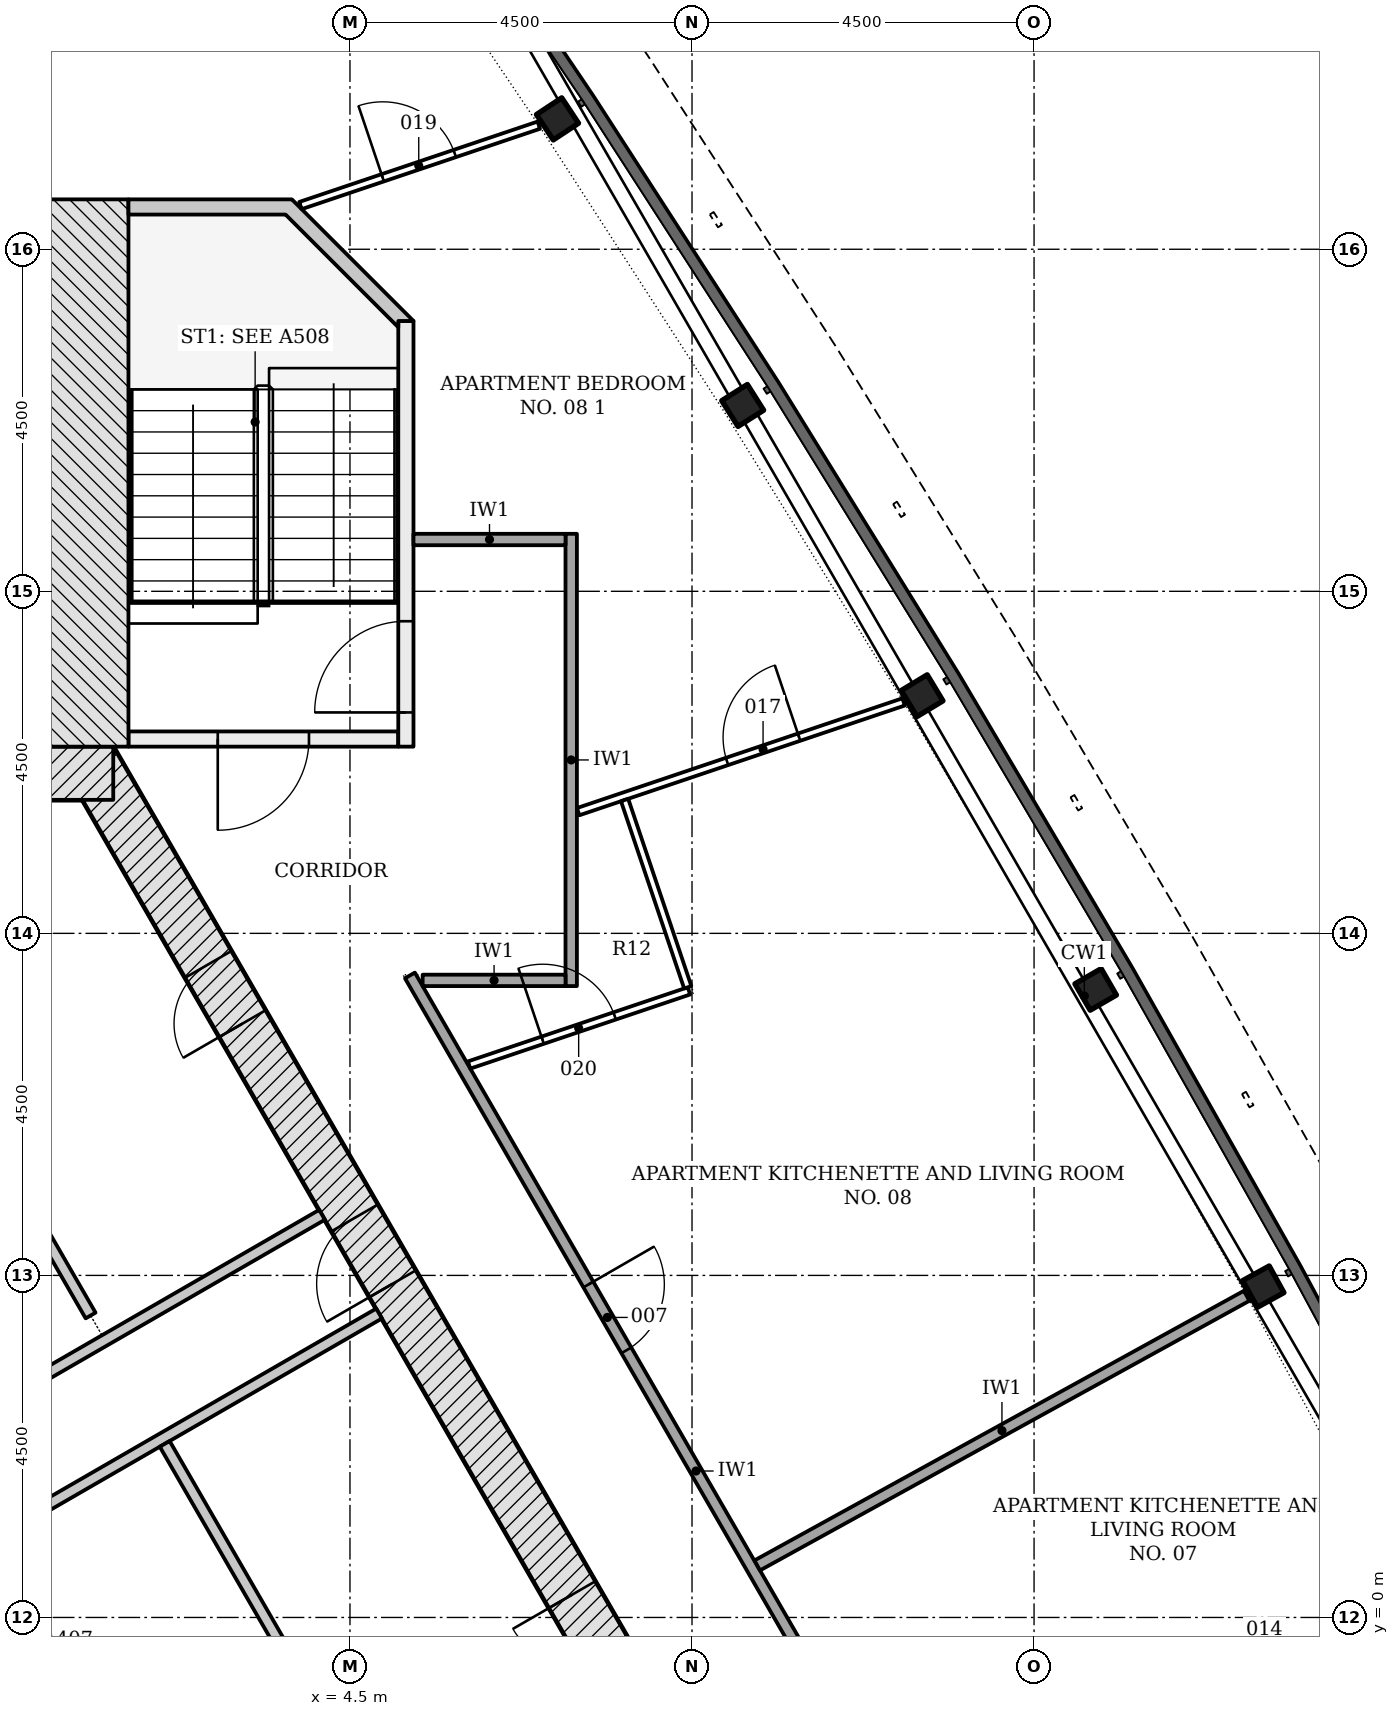
"""IFC4 building model, lengths in metres.
Left out: names, types, materials, properties, quantities, classifications, styles, units other than length and angle.
Written with IfcOpenShell. Run it as: python <this file> out.ifc"""

import sys

from ifc_helpers import new_model, si_unit, direction, frame, frame_2d, origin, origin_2d, place, context, subcontext, project, spatial, polyline, rectangle, i_section, outline, extrude, element, fill, save


model = new_model("IFC4")
c1 = context("Model", 3, precision=1e-05, world=origin(), true_north=direction((0.0, 1.0)))
c2 = subcontext(c1, "Body", "Model", "MODEL_VIEW")
j1 = project(units=[si_unit("LENGTHUNIT", "METRE"), si_unit("PLANEANGLEUNIT", "RADIAN")], contexts=[c1])
p1 = place(None, origin())
s1 = spatial("IfcSite", under=j1, at=p1, CompositionType="ELEMENT")
p2 = place(p1, origin())
s2 = spatial("IfcBuilding", under=s1, at=p2, CompositionType="ELEMENT")
p3 = place(p2, frame((0.0, 0.0, 109.5)))
s3 = spatial("IfcBuildingStorey", under=s2, at=p3, CompositionType="ELEMENT", Elevation=109.5)
p4 = place(p3, frame((10.311, -4.703, -0.2), z_axis=(0.0, 0.0, 1.0), x_axis=(-0.500001446645, 0.866024568562, 0.0)))
e1 = element("IfcWall", 1, at=p4, inside=s3, PredefinedType="SHEAR", context=c2, shape_type="SweptSolid", body=[
    extrude(rectangle(XDim=18.458, YDim=0.7, at=frame_2d((9.229, 0.0))), origin(), (0.0, 0.0, 1.0), 3.6),
])
p5 = place(p4, frame((10.5, 0.0, 0.2)))
e2 = element("IfcOpeningElement", 2, at=p5, cuts=e1, PredefinedType="OPENING", context=c2, shape_type="SweptSolid", body=[
    extrude(rectangle(XDim=1.0, YDim=2.1, at=frame_2d((0.5, 1.05))), frame((0.0, 0.36, 0.0), z_axis=(0.0, -1.0, 0.0), x_axis=(1.0, 0.0, 0.0)), (0.0, 0.0, 1.0), 0.72),
])
p6 = place(p4, frame((4.877, 0.0, 0.2)))
e3 = element("IfcOpeningElement", 3, at=p6, cuts=e1, PredefinedType="OPENING", context=c2, shape_type="SweptSolid", body=[
    extrude(rectangle(XDim=0.9, YDim=2.1, at=frame_2d((0.45, 1.05))), frame((0.0, 0.36, 0.0), z_axis=(0.0, -1.0, 0.0), x_axis=(1.0, 0.0, 0.0)), (0.0, 0.0, 1.0), 0.72),
])
p7 = place(p4, frame((14.452, 0.0, 0.2)))
e4 = element("IfcOpeningElement", 4, at=p7, cuts=e1, PredefinedType="OPENING", context=c2, shape_type="SweptSolid", body=[
    extrude(rectangle(XDim=0.9, YDim=2.1, at=frame_2d((0.45, 1.05))), frame((0.0, 0.36, 0.0), z_axis=(0.0, -1.0, 0.0), x_axis=(1.0, 0.0, 0.0)), (0.0, 0.0, 1.0), 0.72),
])
p8 = place(p3, frame((1.386, 11.106, -0.2), z_axis=(0.0, 0.0, 1.0), x_axis=(-1.0, 0.0, 0.0)))
e5 = element("IfcWall", 5, at=p8, inside=s3, PredefinedType="SHEAR", context=c2, shape_type="SweptSolid", body=[
    extrude(rectangle(XDim=2.771, YDim=0.7, at=frame_2d((1.386, 0.0))), origin(), (0.0, 0.0, 1.0), 3.6),
])
for number, where, z_axis, x_axis in (
    (6, (16.516, 4.353, -0.2), (0.0, 0.0, 1.0), (-0.483, 0.876, 0.0)),
    (7, (14.311, 8.262, -0.2), (0.0, 0.0, 1.0), (-0.5, 0.866, 0.0)),
    (8, (12.027, 12.127, -0.2), (0.0, 0.0, 1.0), (-0.517, 0.856, 0.0)),
    (9, (9.667, 15.945, -0.2), (0.0, 0.0, 1.0), (-0.534, 0.845, 0.0)),
    (10, (7.23, 19.715, -0.2), (0.0, 0.0, 1.0), (-0.551, 0.834, 0.0)),
):
    element("IfcColumn", number, at=place(p3, frame(where, z_axis=z_axis, x_axis=x_axis)), inside=s3, PredefinedType="COLUMN", context=c2, shape_type="SweptSolid", body=[
        extrude(i_section(OverallWidth=0.401, OverallDepth=0.399, WebThickness=0.025, FlangeThickness=0.04, FilletRadius=0.015, at=origin_2d()), origin(), (0.0, 0.0, 1.0), 3.6),
    ])
p9 = place(p3, frame((-4.198, -1.244, 0.0), z_axis=(0.0, 0.0, 1.0), x_axis=(0.866020798945, 0.500007975732, 0.0)))
e11 = element("IfcWall", 11, at=p9, inside=s3, PredefinedType="PARTITIONING", context=c2, shape_type="SweptSolid", body=[
    extrude(rectangle(XDim=10.486, YDim=0.15, at=frame_2d((5.243, 0.0))), origin(), (0.0, 0.0, 1.0), 3.4),
])
p10 = place(p9, frame((3.736, 0.0, 0.0)))
e12 = element("IfcOpeningElement", 12, at=p10, cuts=e11, PredefinedType="OPENING", context=c2, shape_type="SweptSolid", body=[
    extrude(rectangle(XDim=0.9, YDim=2.1, at=frame_2d((0.45, 1.05))), frame((0.0, 0.085, 0.0), z_axis=(0.0, -1.0, 0.0), x_axis=(1.0, 0.0, 0.0)), (0.0, 0.0, 1.0), 0.17),
])
p11 = place(p9, frame((0.144, 0.0, 0.0)))
e13 = element("IfcOpeningElement", 13, at=p11, cuts=e11, PredefinedType="OPENING", context=c2, shape_type="SweptSolid", body=[
    extrude(rectangle(XDim=0.9, YDim=2.1, at=frame_2d((0.45, 1.05))), frame((0.0, 0.085, 0.0), z_axis=(0.0, -1.0, 0.0), x_axis=(1.0, 0.0, 0.0)), (0.0, 0.0, 1.0), 0.17),
])
p12 = place(p3, frame((5.367, -3.439, 0.0), z_axis=(0.0, 0.0, 1.0), x_axis=(-0.499981499682, 0.866036084685, 0.0)))
e14 = element("IfcWall", 14, at=p12, inside=s3, PredefinedType="PARTITIONING", context=c2, shape_type="SweptSolid", body=[
    extrude(rectangle(XDim=6.608, YDim=0.15, at=frame_2d((3.304, 0.0))), origin(), (0.0, 0.0, 1.0), 3.4),
])
p13 = place(p3, frame((-2.698, 1.354, 0.0), z_axis=(0.0, 0.0, 1.0), x_axis=(0.866021157486, 0.500007354732, 0.0)))
e15 = element("IfcWall", 15, at=p13, inside=s3, PredefinedType="PARTITIONING", context=c2, shape_type="SweptSolid", body=[
    extrude(rectangle(XDim=7.888, YDim=0.15, at=frame_2d((3.944, 0.0))), origin(), (0.0, 0.0, 1.0), 3.4),
])
p14 = place(p13, frame((1.845, 0.0, 0.0)))
e16 = element("IfcOpeningElement", 16, at=p14, cuts=e15, PredefinedType="OPENING", context=c2, shape_type="SweptSolid", body=[
    extrude(rectangle(XDim=0.9, YDim=2.1, at=frame_2d((0.45, 1.05))), frame((0.0, 0.085, 0.0), z_axis=(0.0, -1.0, 0.0), x_axis=(1.0, 0.0, 0.0)), (0.0, 0.0, 1.0), 0.17),
])
p15 = place(p3, frame((1.088, 3.972, 0.0), z_axis=(0.0, 0.0, 1.0), x_axis=(-0.500116913307, 0.865957893332, 0.0)))
e17 = element("IfcWall", 17, at=p15, inside=s3, PredefinedType="PARTITIONING", context=c2, shape_type="SweptSolid", body=[
    extrude(rectangle(XDim=2.304, YDim=0.15, at=frame_2d((1.152, 0.0))), origin(), (0.0, 0.0, 1.0), 3.4),
])
p16 = place(p3, frame((5.135, 11.556, -0.2), z_axis=(0.0, 0.0, 1.0), x_axis=(-1.0, 0.0, 0.0)))
e18 = element("IfcWall", 18, at=p16, inside=s3, PredefinedType="SHEAR", context=c2, shape_type="SweptSolid", body=[
    extrude(rectangle(XDim=3.55, YDim=0.2, at=frame_2d((1.775, 0.0))), origin(), (0.0, 0.0, 1.0), 3.6),
])
p17 = place(p16, frame((1.175, 0.0, 0.2)))
e19 = element("IfcOpeningElement", 19, at=p17, cuts=e18, PredefinedType="OPENING", context=c2, shape_type="SweptSolid", body=[
    extrude(rectangle(XDim=1.2, YDim=2.1, at=frame_2d((0.6, 1.05))), frame((0.0, 0.11, 0.0), z_axis=(0.0, -1.0, 0.0), x_axis=(1.0, 0.0, 0.0)), (0.0, 0.0, 1.0), 0.22),
])
p18 = place(p3, frame((5.236, 11.456, -0.2), z_axis=(0.0, 0.0, 1.0), x_axis=(0.0, 1.0, 0.0)))
e20 = element("IfcWall", 20, at=p18, inside=s3, PredefinedType="SHEAR", context=c2, shape_type="SweptSolid", body=[
    extrude(rectangle(XDim=5.6, YDim=0.2, at=frame_2d((2.8, 0.0))), origin(), (0.0, 0.0, 1.0), 3.6),
])
p19 = place(p18, frame((0.45, 0.0, 0.2)))
e21 = element("IfcOpeningElement", 21, at=p19, cuts=e20, PredefinedType="OPENING", context=c2, shape_type="SweptSolid", body=[
    extrude(rectangle(XDim=1.2, YDim=2.1, at=frame_2d((0.6, 1.05))), frame((0.0, 0.11, 0.0), z_axis=(0.0, -1.0, 0.0), x_axis=(1.0, 0.0, 0.0)), (0.0, 0.0, 1.0), 0.22),
])
p20 = place(p3, frame((0.993, 11.456, -0.2), z_axis=(0.0, 0.0, 1.0), x_axis=(0.0, 1.0, 0.0)))
e22 = element("IfcWall", 22, at=p20, inside=s3, PredefinedType="SHEAR", context=c2, shape_type="SweptSolid", body=[
    extrude(rectangle(XDim=7.2, YDim=1.186, at=frame_2d((3.6, 0.0))), origin(), (0.0, 0.0, 1.0), 3.6),
])
p21 = place(p3, frame((0.0, 0.0, -0.2)))
e23 = element("IfcWall", 23, at=p21, inside=s3, PredefinedType="SHEAR", context=c2, shape_type="SweptSolid", body=[
    extrude(outline(polyline([(5.336, 17.056), (3.736, 18.656), (1.586, 18.656), (1.586, 18.456), (3.653, 18.456), (5.135, 16.974), (5.135, 17.056), (5.135, 17.056), (5.135, 17.056), (5.135, 17.056), (5.135, 17.056), (5.135, 17.056), (5.135, 17.056), (5.135, 17.056), (5.135, 17.056), (5.135, 17.056), (5.135, 17.056), (5.135, 17.056), (5.135, 17.056), (5.135, 17.056), (5.135, 17.056), (5.135, 17.056), (5.135, 17.056), (5.336, 17.056)])), origin(), (0.0, 0.0, 1.0), 3.6),
])
p22 = place(p3, frame((5.289, 8.446, 0.0), z_axis=(0.0, 0.0, 1.0), x_axis=(0.499996620721, -0.866027354803, 0.0)))
e24 = element("IfcWall", 24, at=p22, inside=s3, PredefinedType="PARTITIONING", context=c2, shape_type="SweptSolid", body=[
    extrude(rectangle(XDim=15.057, YDim=0.15, at=frame_2d((7.528, 0.0))), origin(), (0.0, 0.0, 1.0), 2.847),
])
p23 = place(p22, frame((10.689, 0.0, 0.0)))
e25 = element("IfcOpeningElement", 25, at=p23, cuts=e24, PredefinedType="OPENING", context=c2, shape_type="SweptSolid", body=[
    extrude(rectangle(XDim=1.0, YDim=2.1, at=frame_2d((0.5, 1.05))), frame((0.0, 0.085, 0.0), z_axis=(0.0, -1.0, 0.0), x_axis=(1.0, 0.0, 0.0)), (0.0, 0.0, 1.0), 0.17),
])
p24 = place(p22, frame((4.695, 0.0, 0.0)))
e26 = element("IfcOpeningElement", 26, at=p24, cuts=e24, PredefinedType="OPENING", context=c2, shape_type="SweptSolid", body=[
    extrude(rectangle(XDim=1.0, YDim=2.1, at=frame_2d((0.5, 1.05))), frame((0.0, 0.085, 0.0), z_axis=(0.0, -1.0, 0.0), x_axis=(1.0, 0.0, 0.0)), (0.0, 0.0, 1.0), 0.17),
])
p25 = place(p3, frame((7.411, 8.306, 0.0), z_axis=(0.0, 0.0, 1.0), x_axis=(0.0, 1.0, 0.0)))
e27 = element("IfcWall", 27, at=p25, inside=s3, PredefinedType="PARTITIONING", context=c2, shape_type="SweptSolid", body=[
    extrude(rectangle(XDim=5.95, YDim=0.15, at=frame_2d((2.975, 0.0))), origin(), (0.0, 0.0, 1.0), 2.847),
])
p26 = place(p3, frame((5.336, 14.181, 0.0), z_axis=(0.0, 0.0, 1.0), x_axis=(1.0, 0.0, 0.0)))
e28 = element("IfcWall", 28, at=p26, inside=s3, PredefinedType="PARTITIONING", context=c2, shape_type="SweptSolid", body=[
    extrude(rectangle(XDim=2.0, YDim=0.15, at=frame_2d((1.0, 0.0))), origin(), (0.0, 0.0, 1.0), 2.923),
])
p27 = place(p3, frame((5.456, 8.381, 0.0), z_axis=(0.0, 0.0, 1.0), x_axis=(1.0, 0.0, 0.0)))
e29 = element("IfcWall", 29, at=p27, inside=s3, PredefinedType="PARTITIONING", context=c2, shape_type="SweptSolid", body=[
    extrude(rectangle(XDim=1.88, YDim=0.15, at=frame_2d((0.94, 0.0))), origin(), (0.0, 0.0, 1.0), 2.847),
])
p28 = place(p3, frame((16.297, 4.232, 0.0), z_axis=(0.0, 0.0, 1.0), x_axis=(-0.875895262359, -0.482501284327, 0.0)))
e30 = element("IfcWall", 30, at=p28, inside=s3, PredefinedType="PARTITIONING", context=c2, shape_type="SweptSolid", body=[
    extrude(rectangle(XDim=7.351, YDim=0.15, at=frame_2d((3.676, 0.0))), origin(), (0.0, 0.0, 1.0), 2.847),
])
p29 = place(p3, frame((18.421, 0.283, 0.0), z_axis=(0.0, 0.0, 1.0), x_axis=(-0.885392336097, -0.464844502151, 0.0)))
e31 = element("IfcWall", 31, at=p29, inside=s3, PredefinedType="PARTITIONING", context=c2, shape_type="SweptSolid", body=[
    extrude(rectangle(XDim=7.22, YDim=0.1, at=frame_2d((3.61, 0.0))), origin(), (0.0, 0.0, 1.0), 2.847),
])
p30 = place(p29, frame((5.196, 0.0, 0.0)))
e32 = element("IfcOpeningElement", 32, at=p30, cuts=e31, PredefinedType="OPENING", context=c2, shape_type="SweptSolid", body=[
    extrude(rectangle(XDim=1.0, YDim=2.1, at=frame_2d((0.5, 1.05))), frame((0.0, 0.06, 0.0), z_axis=(0.0, -1.0, 0.0), x_axis=(1.0, 0.0, 0.0)), (0.0, 0.0, 1.0), 0.12),
])
p31 = place(p29, frame((1.634, 0.0, 0.0)))
e33 = element("IfcOpeningElement", 33, at=p31, cuts=e31, PredefinedType="OPENING", context=c2, shape_type="SweptSolid", body=[
    extrude(rectangle(XDim=1.0, YDim=2.1, at=frame_2d((0.5, 1.05))), frame((0.0, 0.06, 0.0), z_axis=(0.0, -1.0, 0.0), x_axis=(1.0, 0.0, 0.0)), (0.0, 0.0, 1.0), 0.12),
])
p32 = place(p3, frame((7.502, 10.601, 0.0), z_axis=(0.0, 0.0, 1.0), x_axis=(0.947570000993, 0.319548264303, 0.0)))
e34 = element("IfcWall", 34, at=p32, inside=s3, PredefinedType="PARTITIONING", context=c2, shape_type="SweptSolid", body=[
    extrude(rectangle(XDim=4.519, YDim=0.1, at=frame_2d((2.26, 0.0))), origin(), (0.0, 0.0, 1.0), 2.847),
])
p33 = place(p32, frame((2.068, 0.0, 0.0)))
e35 = element("IfcOpeningElement", 35, at=p33, cuts=e34, PredefinedType="OPENING", context=c2, shape_type="SweptSolid", body=[
    extrude(rectangle(XDim=1.0, YDim=2.1, at=frame_2d((0.5, 1.05))), frame((0.0, 0.06, 0.0), z_axis=(0.0, -1.0, 0.0), x_axis=(1.0, 0.0, 0.0)), (0.0, 0.0, 1.0), 0.12),
])
p34 = place(p3, frame((3.849, 18.575, 0.0), z_axis=(0.0, 0.0, 1.0), x_axis=(0.947578304543, 0.319523640375, 0.0)))
e36 = element("IfcWall", 36, at=p34, inside=s3, PredefinedType="PARTITIONING", context=c2, shape_type="SweptSolid", body=[
    extrude(rectangle(XDim=3.309, YDim=0.1, at=frame_2d((1.655, 0.0))), origin(), (0.0, 0.0, 1.0), 2.974),
])
p35 = place(p34, frame((1.142, 0.0, 0.0)))
e37 = element("IfcOpeningElement", 37, at=p35, cuts=e36, PredefinedType="OPENING", context=c2, shape_type="SweptSolid", body=[
    extrude(rectangle(XDim=1.0, YDim=2.1, at=frame_2d((0.5, 1.05))), frame((0.0, 0.06, 0.0), z_axis=(0.0, -1.0, 0.0), x_axis=(1.0, 0.0, 0.0)), (0.0, 0.0, 1.0), 0.12),
])
p36 = place(p3, frame((6.067, 7.268, 0.0), z_axis=(0.0, 0.0, 1.0), x_axis=(0.94756585242, 0.319560565978, 0.0)))
e38 = element("IfcWall", 38, at=p36, inside=s3, PredefinedType="PARTITIONING", context=c2, shape_type="SweptSolid", body=[
    extrude(rectangle(XDim=3.053, YDim=0.1, at=frame_2d((1.526, 0.0))), origin(), (0.0, 0.0, 1.0), 3.4),
])
p37 = place(p36, frame((1.021, 0.0, 0.0)))
e39 = element("IfcOpeningElement", 39, at=p37, cuts=e38, PredefinedType="OPENING", context=c2, shape_type="SweptSolid", body=[
    extrude(rectangle(XDim=1.0, YDim=2.1, at=frame_2d((0.5, 1.05))), frame((0.0, 0.06, 0.0), z_axis=(0.0, -1.0, 0.0), x_axis=(1.0, 0.0, 0.0)), (0.0, 0.0, 1.0), 0.12),
])
p38 = place(p3, frame((8.113, 10.754, 0.0), z_axis=(0.0, 0.0, 1.0), x_axis=(0.31954997077, -0.94756942552, 0.0)))
e40 = element("IfcWall", 40, at=p38, inside=s3, PredefinedType="PARTITIONING", context=c2, shape_type="SweptSolid", body=[
    extrude(rectangle(XDim=2.6, YDim=0.1, at=frame_2d((1.3, 0.0))), origin(), (0.0, 0.0, 1.0), 2.847),
])
p39 = place(p5, origin())
e41 = element("IfcDoor", 41, at=p39, inside=s3, OperationType="SINGLE_SWING_LEFT", PredefinedType="DOOR", context=c2, shape_type="SweptSolid", body=[
    extrude(rectangle(XDim=1.0, YDim=2.1, at=frame_2d((0.5, 1.05))), frame((0.0, 0.075, 0.0), z_axis=(0.0, -1.0, 0.0), x_axis=(1.0, 0.0, 0.0)), (0.0, 0.0, 1.0), 0.15),
])
fill(e2, e41)
p40 = place(p6, origin())
e42 = element("IfcDoor", 42, at=p40, inside=s3, OperationType="SINGLE_SWING_RIGHT", PredefinedType="DOOR", context=c2, shape_type="SweptSolid", body=[
    extrude(rectangle(XDim=0.9, YDim=2.1, at=frame_2d((0.45, 1.05))), frame((0.0, 0.075, 0.0), z_axis=(0.0, -1.0, 0.0), x_axis=(1.0, 0.0, 0.0)), (0.0, 0.0, 1.0), 0.15),
])
fill(e3, e42)
p41 = place(p7, origin())
e43 = element("IfcDoor", 43, at=p41, inside=s3, OperationType="SINGLE_SWING_LEFT", PredefinedType="DOOR", context=c2, shape_type="SweptSolid", body=[
    extrude(rectangle(XDim=0.9, YDim=2.1, at=frame_2d((0.45, 1.05))), frame((0.0, 0.075, 0.0), z_axis=(0.0, -1.0, 0.0), x_axis=(1.0, 0.0, 0.0)), (0.0, 0.0, 1.0), 0.15),
])
fill(e4, e43)
p42 = place(p17, origin())
e44 = element("IfcDoor", 44, at=p42, inside=s3, OperationType="SINGLE_SWING_RIGHT", PredefinedType="DOOR", context=c2, shape_type="SweptSolid", body=[
    extrude(rectangle(XDim=1.2, YDim=2.1, at=frame_2d((0.6, 1.05))), frame((0.0, 0.025, 0.0), z_axis=(0.0, -1.0, 0.0), x_axis=(1.0, 0.0, 0.0)), (0.0, 0.0, 1.0), 0.05),
])
fill(e19, e44)
p43 = place(p19, origin())
e45 = element("IfcDoor", 45, at=p43, inside=s3, OperationType="SINGLE_SWING_LEFT", PredefinedType="DOOR", context=c2, shape_type="SweptSolid", body=[
    extrude(rectangle(XDim=1.2, YDim=2.1, at=frame_2d((0.6, 1.05))), frame((0.0, 0.025, 0.0), z_axis=(0.0, -1.0, 0.0), x_axis=(1.0, 0.0, 0.0)), (0.0, 0.0, 1.0), 0.05),
])
fill(e21, e45)
p44 = place(p24, origin())
e46 = element("IfcDoor", 46, at=p44, inside=s3, OperationType="SINGLE_SWING_LEFT", PredefinedType="DOOR", context=c2, shape_type="SweptSolid", body=[
    extrude(rectangle(XDim=1.0, YDim=2.1, at=frame_2d((0.5, 1.05))), frame((0.0, 0.025, 0.0), z_axis=(0.0, -1.0, 0.0), x_axis=(1.0, 0.0, 0.0)), (0.0, 0.0, 1.0), 0.05),
])
fill(e26, e46)
p45 = place(p33, origin())
e47 = element("IfcDoor", 47, at=p45, inside=s3, OperationType="SINGLE_SWING_RIGHT", PredefinedType="DOOR", context=c2, shape_type="SweptSolid", body=[
    extrude(rectangle(XDim=1.0, YDim=2.1, at=frame_2d((0.5, 1.05))), frame((0.0, 0.025, 0.0), z_axis=(0.0, -1.0, 0.0), x_axis=(1.0, 0.0, 0.0)), (0.0, 0.0, 1.0), 0.05),
])
fill(e35, e47)
p46 = place(p35, origin())
e48 = element("IfcDoor", 48, at=p46, inside=s3, OperationType="SINGLE_SWING_LEFT", PredefinedType="DOOR", context=c2, shape_type="SweptSolid", body=[
    extrude(rectangle(XDim=1.0, YDim=2.1, at=frame_2d((0.5, 1.05))), frame((0.0, 0.025, 0.0), z_axis=(0.0, -1.0, 0.0), x_axis=(1.0, 0.0, 0.0)), (0.0, 0.0, 1.0), 0.05),
])
fill(e37, e48)
p47 = place(p37, origin())
e49 = element("IfcDoor", 49, at=p47, inside=s3, OperationType="SINGLE_SWING_LEFT", PredefinedType="DOOR", context=c2, shape_type="SweptSolid", body=[
    extrude(rectangle(XDim=1.0, YDim=2.1, at=frame_2d((0.5, 1.05))), frame((0.0, 0.025, 0.0), z_axis=(0.0, -1.0, 0.0), x_axis=(1.0, 0.0, 0.0)), (0.0, 0.0, 1.0), 0.05),
])
fill(e39, e49)
save(model, sys.argv[1])
